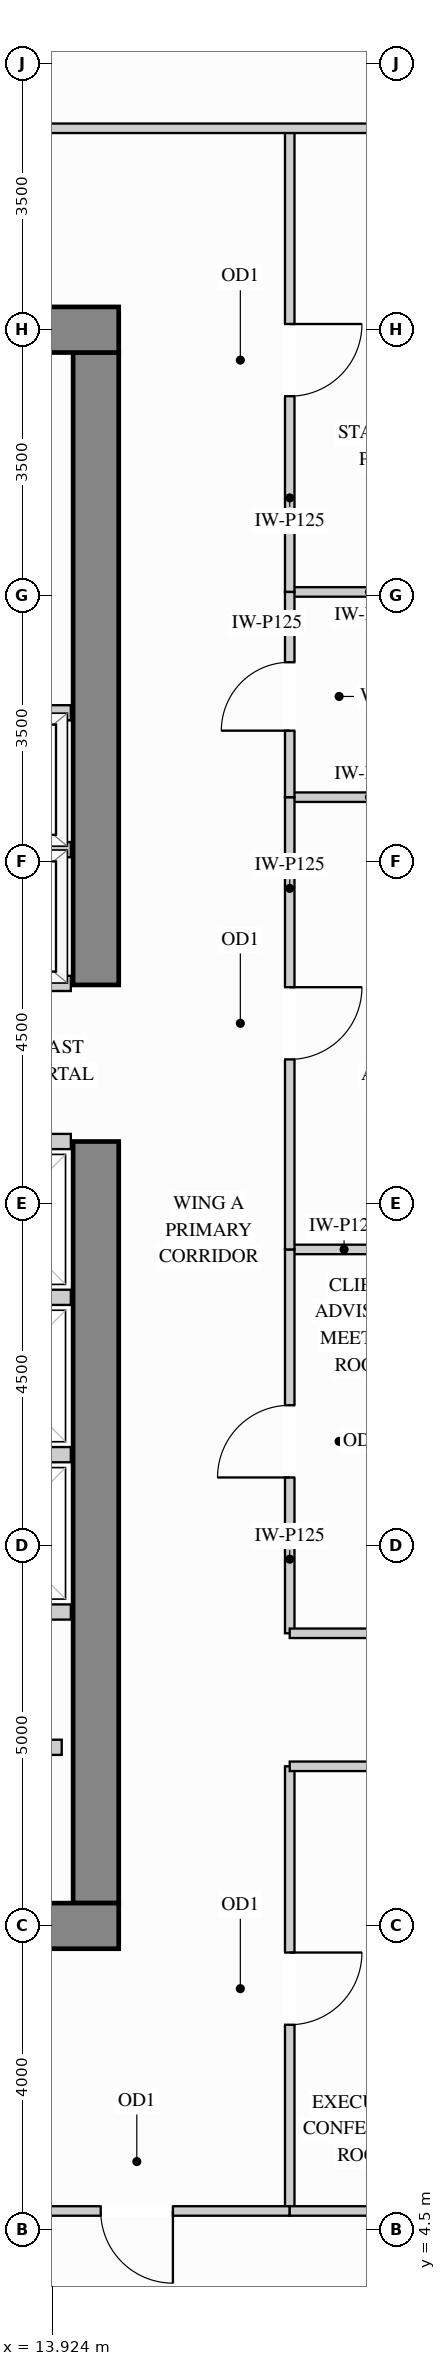
"""IFC4 building model, lengths in metres.
Left out: names, types, materials, properties, quantities, classifications, styles, units other than length and angle.
Written with IfcOpenShell. Run it as: python <this file> out.ifc"""

import sys

from ifc_helpers import new_model, si_unit, direction, frame, frame_2d, origin, place, context, subcontext, project, spatial, rectangle, extrude, source, transform, mapped, element, fill, save


model = new_model("IFC4")
c1 = context("Model", 3, precision=1e-05, world=origin(), true_north=direction((0.0, 1.0)))
c2 = subcontext(c1, "Body", "Model", "MODEL_VIEW")
j1 = project(units=[si_unit("LENGTHUNIT", "METRE"), si_unit("PLANEANGLEUNIT", "RADIAN")], contexts=[c1])
p1 = place(None, origin())
s1 = spatial("IfcSite", under=j1, at=p1, CompositionType="ELEMENT")
p2 = place(p1, origin())
s2 = spatial("IfcBuilding", under=s1, at=p2, CompositionType="ELEMENT")
p3 = place(p2, frame((0.0, 0.0, 164.7)))
s3 = spatial("IfcBuildingStorey", under=s2, at=p3, CompositionType="ELEMENT", Elevation=164.7)
m1 = source(origin(), c2, "Body", "SweptSolid", [
    extrude(rectangle(XDim=10.02, YDim=0.6, at=frame_2d((5.01, 0.0))), origin(), (0.0, 0.0, 1.0), 3.4),
])
p4 = place(p3, frame((14.5, 8.8, 0.0), z_axis=(0.0, 0.0, 1.0), x_axis=(0.0, 1.0, 0.0)))
e1 = element("IfcWall", 1, at=p4, inside=s3, PredefinedType="SHEAR", context=c2, shape_type="MappedRepresentation", body=[
    mapped(m1, transform((0.0, 0.0, 0.0), x_axis=(1.0, 0.0, 0.0), y_axis=(0.0, 1.0, 0.0), z_axis=(0.0, 0.0, 1.0))),
])
m2 = source(origin(), c2, "Body", "SweptSolid", [
    extrude(rectangle(XDim=8.32, YDim=0.6, at=frame_2d((4.16, 0.0))), origin(), (0.0, 0.0, 1.0), 3.4),
])
p5 = place(p3, frame((14.5, 20.88, 0.0), z_axis=(0.0, 0.0, 1.0), x_axis=(0.0, 1.0, 0.0)))
e2 = element("IfcWall", 2, at=p5, inside=s3, PredefinedType="SHEAR", context=c2, shape_type="MappedRepresentation", body=[
    mapped(m2, transform((0.0, 0.0, 0.0), x_axis=(1.0, 0.0, 0.0), y_axis=(0.0, 1.0, 0.0), z_axis=(0.0, 0.0, 1.0))),
])
m3 = source(origin(), c2, "Body", "SweptSolid", [
    extrude(rectangle(XDim=10.6, YDim=0.6, at=frame_2d((5.3, 0.0))), origin(), (0.0, 0.0, 1.0), 3.4),
])
for number, where, z_axis, x_axis in (
    (3, (4.2, 29.5, 0.0), (0.0, 0.0, 1.0), (1.0, 0.0, 0.0)),
    (4, (4.2, 8.5, 0.0), (0.0, 0.0, 1.0), (1.0, 0.0, 0.0)),
):
    element("IfcWall", number, at=place(p3, frame(where, z_axis=z_axis, x_axis=x_axis)), inside=s3, PredefinedType="SHEAR", context=c2, shape_type="MappedRepresentation", body=[
        mapped(m3, transform((0.0, 0.0, 0.0), x_axis=(1.0, 0.0, 0.0), y_axis=(0.0, 1.0, 0.0), z_axis=(0.0, 0.0, 1.0))),
    ])
m4 = source(origin(), c2, "Body", "SweptSolid", [
    extrude(rectangle(XDim=2.1, YDim=0.125, at=frame_2d((1.05, 0.0))), origin(), (0.0, 0.0, 1.0), 3.385),
])
p6 = place(p3, frame((17.05, 17.4, 0.0), z_axis=(0.0, 0.0, 1.0), x_axis=(1.0, 0.0, 0.0)))
e5 = element("IfcWall", 5, at=p6, inside=s3, PredefinedType="PARTITIONING", context=c2, shape_type="MappedRepresentation", body=[
    mapped(m4, transform((0.0, 0.0, 0.0), x_axis=(1.0, 0.0, 0.0), y_axis=(0.0, 1.0, 0.0), z_axis=(0.0, 0.0, 1.0))),
])
m5 = source(origin(), c2, "Body", "SweptSolid", [
    extrude(rectangle(XDim=2.098, YDim=0.125, at=frame_2d((1.049, 0.0))), origin(), (0.0, 0.0, 1.0), 3.385),
])
for number, where, z_axis, x_axis in (
    (6, (17.05, 23.35, 0.0), (0.0, 0.0, 1.0), (1.0, 0.0, 0.0)),
    (7, (17.05, 26.05, 0.0), (0.0, 0.0, 1.0), (1.0, 0.0, 0.0)),
):
    element("IfcWall", number, at=place(p3, frame(where, z_axis=z_axis, x_axis=x_axis)), inside=s3, PredefinedType="PARTITIONING", context=c2, shape_type="MappedRepresentation", body=[
        mapped(m5, transform((0.0, 0.0, 0.0), x_axis=(1.0, 0.0, 0.0), y_axis=(0.0, 1.0, 0.0), z_axis=(0.0, 0.0, 1.0))),
    ])
p7 = place(p3, frame((17.05, 12.35, 0.0), z_axis=(0.0, 0.0, 1.0), x_axis=(0.0, 1.0, 0.0)))
e8 = element("IfcWall", 8, at=p7, inside=s3, PredefinedType="PARTITIONING", context=c2, shape_type="SweptSolid", body=[
    extrude(rectangle(XDim=5.05, YDim=0.125, at=frame_2d((2.525, 0.0))), origin(), (0.0, 0.0, 1.0), 3.385),
])
p8 = place(p7, frame((2.05, 0.0, 0.0)))
e9 = element("IfcOpeningElement", 9, at=p8, cuts=e8, PredefinedType="OPENING", context=c2, shape_type="SweptSolid", body=[
    extrude(rectangle(XDim=0.95, YDim=2.15, at=frame_2d((0.475, 1.075))), frame((0.0, 0.073, 0.0), z_axis=(0.0, -1.0, 0.0), x_axis=(1.0, 0.0, 0.0)), (0.0, 0.0, 1.0), 0.145),
])
p9 = place(p3, frame((17.05, 17.4, 0.0), z_axis=(0.0, 0.0, 1.0), x_axis=(0.0, 1.0, 0.0)))
e10 = element("IfcWall", 10, at=p9, inside=s3, PredefinedType="PARTITIONING", context=c2, shape_type="SweptSolid", body=[
    extrude(rectangle(XDim=5.95, YDim=0.125, at=frame_2d((2.975, 0.0))), origin(), (0.0, 0.0, 1.0), 3.385),
])
p10 = place(p9, frame((2.5, 0.0, 0.0)))
e11 = element("IfcOpeningElement", 11, at=p10, cuts=e10, PredefinedType="OPENING", context=c2, shape_type="SweptSolid", body=[
    extrude(rectangle(XDim=0.95, YDim=2.15, at=frame_2d((0.475, 1.075))), frame((0.0, 0.073, 0.0), z_axis=(0.0, -1.0, 0.0), x_axis=(1.0, 0.0, 0.0)), (0.0, 0.0, 1.0), 0.145),
])
p11 = place(p3, frame((17.05, 26.05, 0.0), z_axis=(0.0, 0.0, 1.0), x_axis=(0.0, 1.0, 0.0)))
e12 = element("IfcWall", 12, at=p11, inside=s3, PredefinedType="PARTITIONING", context=c2, shape_type="SweptSolid", body=[
    extrude(rectangle(XDim=6.1, YDim=0.125, at=frame_2d((3.05, 0.0))), origin(), (0.0, 0.0, 1.0), 3.385),
])
p12 = place(p11, frame((2.575, 0.0, 0.0)))
e13 = element("IfcOpeningElement", 13, at=p12, cuts=e12, PredefinedType="OPENING", context=c2, shape_type="SweptSolid", body=[
    extrude(rectangle(XDim=0.95, YDim=2.15, at=frame_2d((0.475, 1.075))), frame((0.0, 0.073, 0.0), z_axis=(0.0, -1.0, 0.0), x_axis=(1.0, 0.0, 0.0)), (0.0, 0.0, 1.0), 0.145),
])
p13 = place(p3, frame((17.05, 4.75, 0.0), z_axis=(0.0, 0.0, 1.0), x_axis=(0.0, 1.0, 0.0)))
e14 = element("IfcWall", 14, at=p13, inside=s3, PredefinedType="PARTITIONING", context=c2, shape_type="SweptSolid", body=[
    extrude(rectangle(XDim=5.85, YDim=0.125, at=frame_2d((2.925, 0.0))), origin(), (0.0, 0.0, 1.0), 3.385),
])
p14 = place(p13, frame((2.45, 0.0, 0.0)))
e15 = element("IfcOpeningElement", 15, at=p14, cuts=e14, PredefinedType="OPENING", context=c2, shape_type="SweptSolid", body=[
    extrude(rectangle(XDim=0.95, YDim=2.15, at=frame_2d((0.475, 1.075))), frame((0.0, 0.073, 0.0), z_axis=(0.0, -1.0, 0.0), x_axis=(1.0, 0.0, 0.0)), (0.0, 0.0, 1.0), 0.145),
])
p15 = place(p3, frame((17.05, 23.35, 0.0), z_axis=(0.0, 0.0, 1.0), x_axis=(0.0, 1.0, 0.0)))
e16 = element("IfcWall", 16, at=p15, inside=s3, PredefinedType="PARTITIONING", context=c2, shape_type="SweptSolid", body=[
    extrude(rectangle(XDim=2.7, YDim=0.125, at=frame_2d((1.35, 0.0))), origin(), (0.0, 0.0, 1.0), 3.385),
])
p16 = place(p15, frame((0.875, 0.0, 0.0)))
e17 = element("IfcOpeningElement", 17, at=p16, cuts=e16, PredefinedType="OPENING", context=c2, shape_type="SweptSolid", body=[
    extrude(rectangle(XDim=0.9, YDim=2.15, at=frame_2d((0.45, 1.075))), frame((0.0, 0.073, 0.0), z_axis=(0.0, -1.0, 0.0), x_axis=(1.0, 0.0, 0.0)), (0.0, 0.0, 1.0), 0.145),
])
m6 = source(origin(), c2, "Body", "SweptSolid", [
    extrude(rectangle(XDim=7.498, YDim=0.125, at=frame_2d((3.749, 0.0))), origin(), (0.0, 0.0, 1.0), 3.385),
])
p17 = place(p3, frame((11.65, 32.15, 0.0), z_axis=(0.0, 0.0, 1.0), x_axis=(1.0, 0.0, 0.0)))
e18 = element("IfcWall", 18, at=p17, inside=s3, PredefinedType="PARTITIONING", context=c2, shape_type="MappedRepresentation", body=[
    mapped(m6, transform((0.0, 0.0, 0.0), x_axis=(1.0, 0.0, 0.0), y_axis=(0.0, 1.0, 0.0), z_axis=(0.0, 0.0, 1.0))),
])
m7 = source(origin(), c2, "Body", "SweptSolid", [
    extrude(rectangle(XDim=2.45, YDim=0.125, at=frame_2d((1.225, 0.0))), origin(), (0.0, 0.0, 1.0), 3.385),
])
for number, where, z_axis, x_axis in (
    (19, (17.05, 12.35, 0.0), (0.0, 0.0, 1.0), (1.0, 0.0, 0.0)),
    (20, (17.05, 10.6, 0.0), (0.0, 0.0, 1.0), (1.0, 0.0, 0.0)),
):
    element("IfcWall", number, at=place(p3, frame(where, z_axis=z_axis, x_axis=x_axis)), inside=s3, PredefinedType="PARTITIONING", context=c2, shape_type="MappedRepresentation", body=[
        mapped(m7, transform((0.0, 0.0, 0.0), x_axis=(1.0, 0.0, 0.0), y_axis=(0.0, 1.0, 0.0), z_axis=(0.0, 0.0, 1.0))),
    ])
p18 = place(p3, frame((13.026, 4.75, 0.0), z_axis=(0.0, 0.0, 1.0), x_axis=(1.0, 0.0, 0.0)))
e21 = element("IfcWall", 21, at=p18, inside=s3, PredefinedType="PARTITIONING", context=c2, shape_type="SweptSolid", body=[
    extrude(rectangle(XDim=4.024, YDim=0.125, at=frame_2d((2.012, 0.0))), origin(), (0.0, 0.0, 1.0), 2.848),
])
p19 = place(p18, frame((1.537, 0.0, 0.0)))
e22 = element("IfcOpeningElement", 22, at=p19, cuts=e21, PredefinedType="OPENING", context=c2, shape_type="SweptSolid", body=[
    extrude(rectangle(XDim=0.95, YDim=2.15, at=frame_2d((0.475, 1.075))), frame((0.0, 0.073, 0.0), z_axis=(0.0, -1.0, 0.0), x_axis=(1.0, 0.0, 0.0)), (0.0, 0.0, 1.0), 0.145),
])
m8 = source(origin(), c2, "Body", "SweptSolid", [
    extrude(rectangle(XDim=2.098, YDim=0.125, at=frame_2d((1.049, 0.0))), origin(), (0.0, 0.0, 1.0), 2.848),
])
p20 = place(p3, frame((17.05, 4.75, 0.0), z_axis=(0.0, 0.0, 1.0), x_axis=(1.0, 0.0, 0.0)))
e23 = element("IfcWall", 23, at=p20, inside=s3, PredefinedType="PARTITIONING", context=c2, shape_type="MappedRepresentation", body=[
    mapped(m8, transform((0.0, 0.0, 0.0), x_axis=(1.0, 0.0, 0.0), y_axis=(0.0, 1.0, 0.0), z_axis=(0.0, 0.0, 1.0))),
])
m9 = source(origin(), c2, "Body", "SweptSolid", [
    extrude(rectangle(XDim=1.63, YDim=0.2, at=frame_2d((0.815, 0.0))), origin(), (0.0, 0.0, 1.0), 3.385),
])
p21 = place(p3, frame((12.42, 10.85, 0.0), z_axis=(0.0, 0.0, 1.0), x_axis=(1.0, 0.0, 0.0)))
e24 = element("IfcWall", 24, at=p21, inside=s3, PredefinedType="PARTITIONING", context=c2, shape_type="MappedRepresentation", body=[
    mapped(m9, transform((0.0, 0.0, 0.0), x_axis=(1.0, 0.0, 0.0), y_axis=(0.0, 1.0, 0.0), z_axis=(0.0, 0.0, 1.0))),
])
m10 = source(origin(), c2, "Body", "SweptSolid", [
    extrude(rectangle(XDim=2.34, YDim=0.2, at=frame_2d((1.17, 0.0))), origin(), (0.0, 0.0, 1.0), 3.385),
])
for number, where, z_axis, x_axis in (
    (25, (11.83, 22.66, 0.0), (0.0, 0.0, 1.0), (1.0, 0.0, 0.0)),
    (26, (11.83, 20.9, 0.0), (0.0, 0.0, 1.0), (1.0, 0.0, 0.0)),
    (27, (11.83, 24.46, 0.0), (0.0, 0.0, 1.0), (1.0, 0.0, 0.0)),
):
    element("IfcWall", number, at=place(p3, frame(where, z_axis=z_axis, x_axis=x_axis)), inside=s3, PredefinedType="PARTITIONING", context=c2, shape_type="MappedRepresentation", body=[
        mapped(m10, transform((0.0, 0.0, 0.0), x_axis=(1.0, 0.0, 0.0), y_axis=(0.0, 1.0, 0.0), z_axis=(0.0, 0.0, 1.0))),
    ])
m11 = source(origin(), c2, "Body", "SweptSolid", [
    extrude(rectangle(XDim=1.94, YDim=0.2, at=frame_2d((0.97, 0.0))), origin(), (0.0, 0.0, 1.0), 3.385),
])
for number, where, z_axis, x_axis in (
    (28, (12.23, 14.7, 0.0), (0.0, 0.0, 1.0), (1.0, 0.0, 0.0)),
    (29, (12.23, 12.63, 0.0), (0.0, 0.0, 1.0), (1.0, 0.0, 0.0)),
    (30, (12.23, 16.77, 0.0), (0.0, 0.0, 1.0), (1.0, 0.0, 0.0)),
    (31, (12.23, 18.82, 0.0), (0.0, 0.0, 1.0), (1.0, 0.0, 0.0)),
):
    element("IfcWall", number, at=place(p3, frame(where, z_axis=z_axis, x_axis=x_axis)), inside=s3, PredefinedType="PARTITIONING", context=c2, shape_type="MappedRepresentation", body=[
        mapped(m11, transform((0.0, 0.0, 0.0), x_axis=(1.0, 0.0, 0.0), y_axis=(0.0, 1.0, 0.0), z_axis=(0.0, 0.0, 1.0))),
    ])
m12 = source(origin(), c2, "Body", "SweptSolid", [
    extrude(rectangle(XDim=0.95, YDim=2.15, at=frame_2d((0.475, 1.075))), frame((0.0, 0.025, 0.0), z_axis=(0.0, -1.0, 0.0), x_axis=(1.0, 0.0, 0.0)), (0.0, 0.0, 1.0), 0.05),
])
p22 = place(p14, origin())
e32 = element("IfcDoor", 32, at=p22, inside=s3, OperationType="SINGLE_SWING_RIGHT", PredefinedType="DOOR", context=c2, shape_type="MappedRepresentation", body=[
    mapped(m12, transform((0.0, 0.0, 0.0), x_axis=(1.0, 0.0, 0.0), y_axis=(0.0, 1.0, 0.0), z_axis=(0.0, 0.0, 1.0))),
])
fill(e15, e32)
p23 = place(p8, origin())
e33 = element("IfcDoor", 33, at=p23, inside=s3, OperationType="SINGLE_SWING_LEFT", PredefinedType="DOOR", context=c2, shape_type="MappedRepresentation", body=[
    mapped(m12, transform((0.0, 0.0, 0.0), x_axis=(1.0, 0.0, 0.0), y_axis=(0.0, 1.0, 0.0), z_axis=(0.0, 0.0, 1.0))),
])
fill(e9, e33)
p24 = place(p10, origin())
e34 = element("IfcDoor", 34, at=p24, inside=s3, OperationType="SINGLE_SWING_RIGHT", PredefinedType="DOOR", context=c2, shape_type="MappedRepresentation", body=[
    mapped(m12, transform((0.0, 0.0, 0.0), x_axis=(1.0, 0.0, 0.0), y_axis=(0.0, 1.0, 0.0), z_axis=(0.0, 0.0, 1.0))),
])
fill(e11, e34)
p25 = place(p12, origin())
e35 = element("IfcDoor", 35, at=p25, inside=s3, OperationType="SINGLE_SWING_RIGHT", PredefinedType="DOOR", context=c2, shape_type="MappedRepresentation", body=[
    mapped(m12, transform((0.0, 0.0, 0.0), x_axis=(1.0, 0.0, 0.0), y_axis=(0.0, 1.0, 0.0), z_axis=(0.0, 0.0, 1.0))),
])
fill(e13, e35)
p26 = place(p19, origin())
e36 = element("IfcDoor", 36, at=p26, inside=s3, OperationType="SINGLE_SWING_RIGHT", PredefinedType="DOOR", context=c2, shape_type="MappedRepresentation", body=[
    mapped(m12, transform((0.0, 0.0, 0.0), x_axis=(1.0, 0.0, 0.0), y_axis=(0.0, 1.0, 0.0), z_axis=(0.0, 0.0, 1.0))),
])
fill(e22, e36)
m13 = source(origin(), c2, "Body", "SweptSolid", [
    extrude(rectangle(XDim=0.9, YDim=2.15, at=frame_2d((0.45, 1.075))), frame((0.0, 0.025, 0.0), z_axis=(0.0, -1.0, 0.0), x_axis=(1.0, 0.0, 0.0)), (0.0, 0.0, 1.0), 0.05),
])
p27 = place(p16, origin())
e37 = element("IfcDoor", 37, at=p27, inside=s3, OperationType="SINGLE_SWING_LEFT", PredefinedType="DOOR", context=c2, shape_type="MappedRepresentation", body=[
    mapped(m13, transform((0.0, 0.0, 0.0), x_axis=(1.0, 0.0, 0.0), y_axis=(0.0, 1.0, 0.0), z_axis=(0.0, 0.0, 1.0))),
])
fill(e17, e37)
save(model, sys.argv[1])
